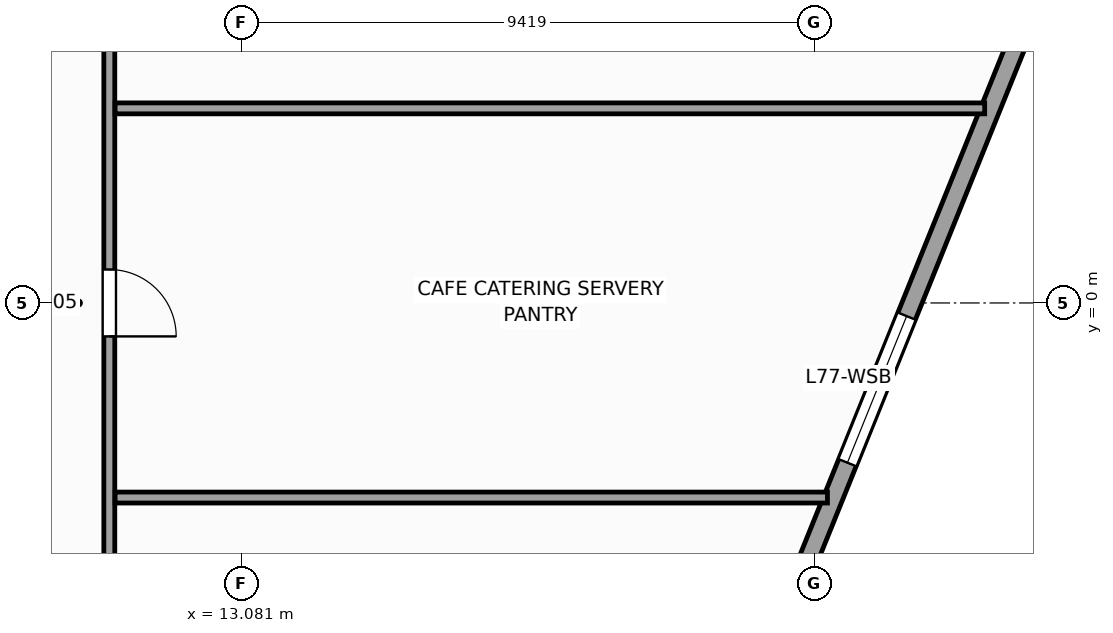
"""IFC4 building model, lengths in metres.
Left out: names, types, materials, properties, quantities, classifications, styles, units other than length and angle.
Written with IfcOpenShell. Run it as: python <this file> out.ifc"""

import sys

from ifc_helpers import new_model, si_unit, direction, frame, frame_2d, origin, place, context, subcontext, project, spatial, rectangle, extrude, source, transform, mapped, element, fill, save


model = new_model("IFC4")
c1 = context("Model", 3, precision=1e-05, world=origin(), true_north=direction((0.0, 1.0)))
c2 = subcontext(c1, "Body", "Model", "MODEL_VIEW")
j1 = project(units=[si_unit("LENGTHUNIT", "METRE"), si_unit("PLANEANGLEUNIT", "RADIAN")], contexts=[c1])
p1 = place(None, origin())
s1 = spatial("IfcSite", under=j1, at=p1, CompositionType="ELEMENT")
p2 = place(p1, origin())
s2 = spatial("IfcBuilding", under=s1, at=p2, CompositionType="ELEMENT")
p3 = place(p2, frame((0.0, 0.0, 312.0)))
s3 = spatial("IfcBuildingStorey", under=s2, at=p3, CompositionType="ELEMENT", Elevation=312.0)
p4 = place(p3, frame((20.718, -8.371, 0.0), z_axis=(0.0, 0.0, 1.0), x_axis=(0.374600710538, 0.927186231382, 0.0)))
e1 = element("IfcWall", 1, at=p4, inside=s3, PredefinedType="STANDARD", context=c2, shape_type="SweptSolid", body=[
    extrude(rectangle(XDim=16.655, YDim=0.31, at=frame_2d((8.328, 0.0))), origin(), (0.0, 0.0, 1.0), 3.95),
])
p5 = place(p4, frame((6.195, 0.0, 0.65)))
e2 = element("IfcOpeningElement", 2, at=p5, cuts=e1, PredefinedType="OPENING", context=c2, shape_type="SweptSolid", body=[
    extrude(rectangle(XDim=2.6, YDim=3.0, at=frame_2d((1.3, 1.5))), frame((0.0, 0.165, 0.0), z_axis=(0.0, -1.0, 0.0), x_axis=(1.0, 0.0, 0.0)), (0.0, 0.0, 1.0), 0.33),
])
p6 = place(p3, frame((10.9, -10.2, 0.0), z_axis=(0.0, 0.0, 1.0), x_axis=(0.0, 1.0, 0.0)))
e3 = element("IfcWall", 3, at=p6, inside=s3, PredefinedType="PARTITIONING", context=c2, shape_type="SweptSolid", body=[
    extrude(rectangle(XDim=21.0, YDim=0.18, at=frame_2d((10.5, 0.0))), origin(), (0.0, 0.0, 1.0), 4.55),
])
p7 = place(p6, frame((9.65, 0.0, 0.0)))
e4 = element("IfcOpeningElement", 4, at=p7, cuts=e3, PredefinedType="OPENING", context=c2, shape_type="SweptSolid", body=[
    extrude(rectangle(XDim=1.1, YDim=2.2, at=frame_2d((0.55, 1.1))), frame((0.0, 0.1, 0.0), z_axis=(0.0, -1.0, 0.0), x_axis=(1.0, 0.0, 0.0)), (0.0, 0.0, 1.0), 0.2),
])
p8 = place(p3, frame((10.995, 3.2, 0.0), z_axis=(0.0, 0.0, 1.0), x_axis=(1.0, 0.0, 0.0)))
e5 = element("IfcWall", 5, at=p8, inside=s3, PredefinedType="PARTITIONING", context=c2, shape_type="SweptSolid", body=[
    extrude(rectangle(XDim=14.301, YDim=0.18, at=frame_2d((7.15, 0.0))), origin(), (0.0, 0.0, 1.0), 4.55),
])
p9 = place(p3, frame((10.995, -3.2, 0.0), z_axis=(0.0, 0.0, 1.0), x_axis=(1.0, 0.0, 0.0)))
e6 = element("IfcWall", 6, at=p9, inside=s3, PredefinedType="PARTITIONING", context=c2, shape_type="SweptSolid", body=[
    extrude(rectangle(XDim=11.715, YDim=0.18, at=frame_2d((5.857, 0.0))), origin(), (0.0, 0.0, 1.0), 4.55),
])
m1 = source(origin(), c2, "Body", "SweptSolid", [
    extrude(rectangle(XDim=2.6, YDim=3.0, at=frame_2d((1.3, 1.5))), frame((0.0, 0.03, 0.0), z_axis=(0.0, -1.0, 0.0), x_axis=(1.0, 0.0, 0.0)), (0.0, 0.0, 1.0), 0.06),
])
p10 = place(p5, origin())
e7 = element("IfcWindow", 7, at=p10, inside=s3, PartitioningType="SINGLE_PANEL", PredefinedType="WINDOW", context=c2, shape_type="MappedRepresentation", body=[
    mapped(m1, transform((0.0, 0.0, 0.0), scale=1.0)),
])
fill(e2, e7)
m2 = source(origin(), c2, "Body", "SweptSolid", [
    extrude(rectangle(XDim=1.1, YDim=2.2, at=frame_2d((0.55, 1.1))), frame((0.0, 0.025, 0.0), z_axis=(0.0, -1.0, 0.0), x_axis=(1.0, 0.0, 0.0)), (0.0, 0.0, 1.0), 0.05),
])
p11 = place(p7, frame((1.1, 0.0, 0.0), z_axis=(0.0, 0.0, 1.0), x_axis=(-1.0, 0.0, 0.0)))
e8 = element("IfcDoor", 8, at=p11, inside=s3, OperationType="SINGLE_SWING_LEFT", PredefinedType="DOOR", context=c2, shape_type="MappedRepresentation", body=[
    mapped(m2, transform((0.0, 0.0, 0.0), scale=1.0)),
])
fill(e4, e8)
save(model, sys.argv[1])
